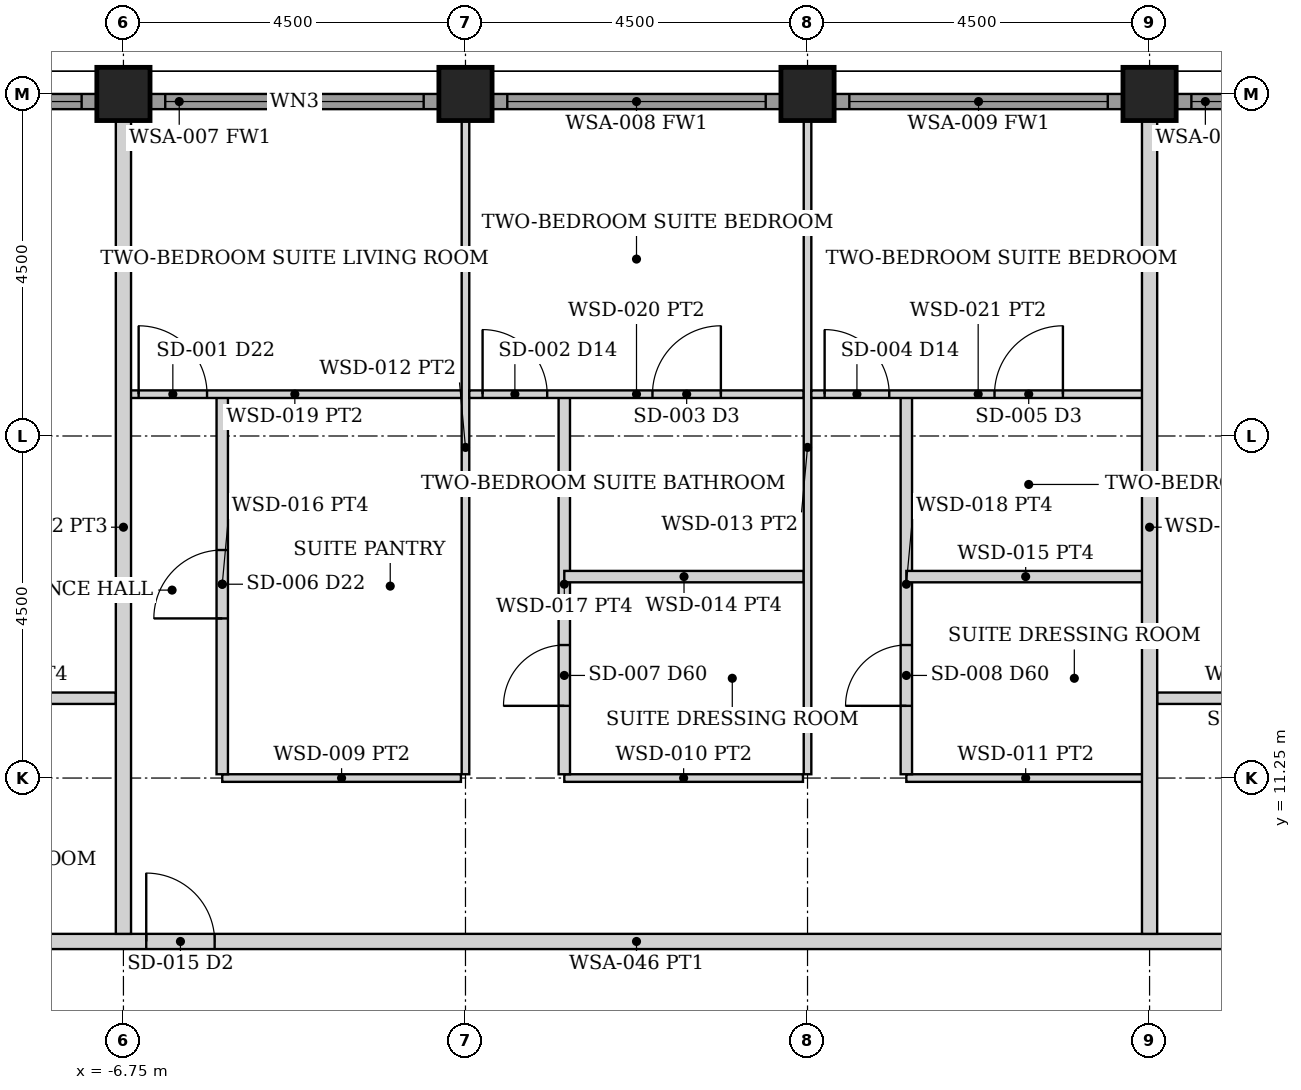
"""IFC4 building model, lengths in metres.
Left out: names, types, materials, properties, quantities, classifications, styles, units other than length and angle.
Written with IfcOpenShell. Run it as: python <this file> out.ifc"""

import sys

from ifc_helpers import new_model, si_unit, direction, frame, frame_2d, origin, origin_2d, place, context, subcontext, project, spatial, rectangle, hollow_rectangle, extrude, element, fill, save


model = new_model("IFC4")
c1 = context("Model", 3, precision=1e-05, world=origin(), true_north=direction((0.0, 1.0)))
c2 = subcontext(c1, "Body", "Model", "MODEL_VIEW")
j1 = project(units=[si_unit("LENGTHUNIT", "METRE"), si_unit("PLANEANGLEUNIT", "RADIAN")], contexts=[c1])
p1 = place(None, origin())
s1 = spatial("IfcSite", under=j1, at=p1, CompositionType="ELEMENT")
p2 = place(p1, origin())
s2 = spatial("IfcBuilding", under=s1, at=p2, CompositionType="ELEMENT")
p3 = place(p2, frame((0.0, 0.0, 234.55)))
s3 = spatial("IfcBuildingStorey", under=s2, at=p3, CompositionType="ELEMENT", Elevation=234.55)
for number, where, z_axis, x_axis in (
    (1, (-6.75, 20.25, 0.0), (0.0, 0.0, 1.0), (0.0, 1.0, 0.0)),
    (2, (-2.25, 20.25, 0.0), (0.0, 0.0, 1.0), (0.0, 1.0, 0.0)),
    (3, (2.25, 20.25, 0.0), (0.0, 0.0, 1.0), (0.0, 1.0, 0.0)),
    (4, (6.75, 20.25, 0.0), (0.0, 0.0, 1.0), (0.0, 1.0, 0.0)),
):
    element("IfcColumn", number, at=place(p3, frame(where, z_axis=z_axis, x_axis=x_axis)), inside=s3, PredefinedType="COLUMN", context=c2, shape_type="SweptSolid", body=[
        extrude(hollow_rectangle(XDim=0.7, YDim=0.7, WallThickness=0.04, at=origin_2d()), origin(), (0.0, 0.0, 1.0), 3.75),
    ])
p4 = place(p3, frame((-10.895, 20.15, 0.0), z_axis=(0.0, 0.0, 1.0), x_axis=(1.0, 0.0, 0.0)))
e5 = element("IfcWall", 5, at=p4, inside=s3, PredefinedType="SOLIDWALL", context=c2, shape_type="SweptSolid", body=[
    extrude(rectangle(XDim=3.79, YDim=0.2, at=frame_2d((1.895, 0.0))), origin(), (0.0, 0.0, 1.0), 2.629),
])
p5 = place(p4, frame((0.195, 0.0, 0.3)))
e6 = element("IfcOpeningElement", 6, at=p5, cuts=e5, PredefinedType="OPENING", context=c2, shape_type="SweptSolid", body=[
    extrude(rectangle(XDim=3.4, YDim=2.179, at=frame_2d((1.7, 1.089))), frame((0.0, 0.11, 0.0), z_axis=(0.0, -1.0, 0.0), x_axis=(1.0, 0.0, 0.0)), (0.0, 0.0, 1.0), 0.22),
])
p6 = place(p3, frame((-6.395, 20.15, 0.0), z_axis=(0.0, 0.0, 1.0), x_axis=(1.0, 0.0, 0.0)))
e7 = element("IfcWall", 7, at=p6, inside=s3, PredefinedType="SOLIDWALL", context=c2, shape_type="SweptSolid", body=[
    extrude(rectangle(XDim=3.79, YDim=0.2, at=frame_2d((1.895, 0.0))), origin(), (0.0, 0.0, 1.0), 2.629),
])
p7 = place(p6, frame((0.195, 0.0, 0.3)))
e8 = element("IfcOpeningElement", 8, at=p7, cuts=e7, PredefinedType="OPENING", context=c2, shape_type="SweptSolid", body=[
    extrude(rectangle(XDim=3.4, YDim=2.179, at=frame_2d((1.7, 1.089))), frame((0.0, 0.11, 0.0), z_axis=(0.0, -1.0, 0.0), x_axis=(1.0, 0.0, 0.0)), (0.0, 0.0, 1.0), 0.22),
])
p8 = place(p3, frame((-1.895, 20.15, 0.0), z_axis=(0.0, 0.0, 1.0), x_axis=(1.0, 0.0, 0.0)))
e9 = element("IfcWall", 9, at=p8, inside=s3, PredefinedType="SOLIDWALL", context=c2, shape_type="SweptSolid", body=[
    extrude(rectangle(XDim=3.79, YDim=0.2, at=frame_2d((1.895, 0.0))), origin(), (0.0, 0.0, 1.0), 2.629),
])
p9 = place(p8, frame((0.195, 0.0, 0.3)))
e10 = element("IfcOpeningElement", 10, at=p9, cuts=e9, PredefinedType="OPENING", context=c2, shape_type="SweptSolid", body=[
    extrude(rectangle(XDim=3.4, YDim=2.179, at=frame_2d((1.7, 1.089))), frame((0.0, 0.11, 0.0), z_axis=(0.0, -1.0, 0.0), x_axis=(1.0, 0.0, 0.0)), (0.0, 0.0, 1.0), 0.22),
])
p10 = place(p3, frame((2.605, 20.15, 0.0), z_axis=(0.0, 0.0, 1.0), x_axis=(1.0, 0.0, 0.0)))
e11 = element("IfcWall", 11, at=p10, inside=s3, PredefinedType="SOLIDWALL", context=c2, shape_type="SweptSolid", body=[
    extrude(rectangle(XDim=3.79, YDim=0.2, at=frame_2d((1.895, 0.0))), origin(), (0.0, 0.0, 1.0), 2.629),
])
p11 = place(p10, frame((0.195, 0.0, 0.3)))
e12 = element("IfcOpeningElement", 12, at=p11, cuts=e11, PredefinedType="OPENING", context=c2, shape_type="SweptSolid", body=[
    extrude(rectangle(XDim=3.4, YDim=2.179, at=frame_2d((1.7, 1.089))), frame((0.0, 0.11, 0.0), z_axis=(0.0, -1.0, 0.0), x_axis=(1.0, 0.0, 0.0)), (0.0, 0.0, 1.0), 0.22),
])
p12 = place(p3, frame((7.105, 20.15, 0.0), z_axis=(0.0, 0.0, 1.0), x_axis=(1.0, 0.0, 0.0)))
e13 = element("IfcWall", 13, at=p12, inside=s3, PredefinedType="SOLIDWALL", context=c2, shape_type="SweptSolid", body=[
    extrude(rectangle(XDim=3.79, YDim=0.2, at=frame_2d((1.895, 0.0))), origin(), (0.0, 0.0, 1.0), 2.629),
])
p13 = place(p12, frame((0.195, 0.0, 0.3)))
e14 = element("IfcOpeningElement", 14, at=p13, cuts=e13, PredefinedType="OPENING", context=c2, shape_type="SweptSolid", body=[
    extrude(rectangle(XDim=3.4, YDim=2.179, at=frame_2d((1.7, 1.089))), frame((0.0, 0.11, 0.0), z_axis=(0.0, -1.0, 0.0), x_axis=(1.0, 0.0, 0.0)), (0.0, 0.0, 1.0), 0.22),
])
p14 = place(p3, frame((-20.05, 9.1, 0.0), z_axis=(0.0, 0.0, 1.0), x_axis=(1.0, 0.0, 0.0)))
e15 = element("IfcWall", 15, at=p14, inside=s3, PredefinedType="PARTITIONING", context=c2, shape_type="SweptSolid", body=[
    extrude(rectangle(XDim=40.1, YDim=0.2, at=frame_2d((20.05, 0.0))), origin(), (0.0, 0.0, 1.0), 2.629),
])
p15 = place(p14, frame((9.0, 0.0, 0.0)))
e16 = element("IfcOpeningElement", 16, at=p15, cuts=e15, PredefinedType="OPENING", context=c2, shape_type="SweptSolid", body=[
    extrude(rectangle(XDim=0.9, YDim=2.1, at=frame_2d((0.45, 1.05))), frame((0.0, 0.11, 0.0), z_axis=(0.0, -1.0, 0.0), x_axis=(1.0, 0.0, 0.0)), (0.0, 0.0, 1.0), 0.22),
])
p16 = place(p14, frame((13.6, 0.0, 0.0)))
e17 = element("IfcOpeningElement", 17, at=p16, cuts=e15, PredefinedType="OPENING", context=c2, shape_type="SweptSolid", body=[
    extrude(rectangle(XDim=0.9, YDim=2.1, at=frame_2d((0.45, 1.05))), frame((0.0, 0.11, 0.0), z_axis=(0.0, -1.0, 0.0), x_axis=(1.0, 0.0, 0.0)), (0.0, 0.0, 1.0), 0.22),
])
p17 = place(p14, frame((30.2, 0.0, 0.0)))
e18 = element("IfcOpeningElement", 18, at=p17, cuts=e15, PredefinedType="OPENING", context=c2, shape_type="SweptSolid", body=[
    extrude(rectangle(XDim=0.9, YDim=2.1, at=frame_2d((0.45, 1.05))), frame((0.0, 0.11, 0.0), z_axis=(0.0, -1.0, 0.0), x_axis=(1.0, 0.0, 0.0)), (0.0, 0.0, 1.0), 0.22),
])
p18 = place(p14, frame((31.75, 0.0, 0.0)))
e19 = element("IfcOpeningElement", 19, at=p18, cuts=e15, PredefinedType="OPENING", context=c2, shape_type="SweptSolid", body=[
    extrude(rectangle(XDim=0.9, YDim=2.1, at=frame_2d((0.45, 1.05))), frame((0.0, 0.11, 0.0), z_axis=(0.0, -1.0, 0.0), x_axis=(1.0, 0.0, 0.0)), (0.0, 0.0, 1.0), 0.22),
])
p19 = place(p14, frame((7.45, 0.0, 0.0)))
e20 = element("IfcOpeningElement", 20, at=p19, cuts=e15, PredefinedType="OPENING", context=c2, shape_type="SweptSolid", body=[
    extrude(rectangle(XDim=0.9, YDim=2.1, at=frame_2d((0.45, 1.05))), frame((0.0, 0.11, 0.0), z_axis=(0.0, -1.0, 0.0), x_axis=(1.0, 0.0, 0.0)), (0.0, 0.0, 1.0), 0.22),
])
p20 = place(p3, frame((-9.9, 12.3, 0.0), z_axis=(0.0, 0.0, 1.0), x_axis=(1.0, 0.0, 0.0)))
e21 = element("IfcWall", 21, at=p20, inside=s3, PredefinedType="PARTITIONING", context=c2, shape_type="SweptSolid", body=[
    extrude(rectangle(XDim=3.05, YDim=0.15, at=frame_2d((1.525, 0.0))), origin(), (0.0, 0.0, 1.0), 2.629),
])
p21 = place(p3, frame((-5.45, 11.25, 0.0), z_axis=(0.0, 0.0, 1.0), x_axis=(1.0, 0.0, 0.0)))
e22 = element("IfcWall", 22, at=p21, inside=s3, PredefinedType="PARTITIONING", context=c2, shape_type="SweptSolid", body=[
    extrude(rectangle(XDim=3.14, YDim=0.1, at=frame_2d((1.57, 0.0))), origin(), (0.0, 0.0, 1.0), 2.629),
])
p22 = place(p3, frame((-5.45, 11.3, 0.0), z_axis=(0.0, 0.0, 1.0), x_axis=(0.0, 1.0, 0.0)))
e23 = element("IfcWall", 23, at=p22, inside=s3, PredefinedType="PARTITIONING", context=c2, shape_type="SweptSolid", body=[
    extrude(rectangle(XDim=5.0, YDim=0.15, at=frame_2d((2.5, 0.0))), origin(), (0.0, 0.0, 1.0), 2.629),
])
p23 = place(p22, frame((2.05, 0.0, 0.0)))
e24 = element("IfcOpeningElement", 24, at=p23, cuts=e23, PredefinedType="OPENING", context=c2, shape_type="SweptSolid", body=[
    extrude(rectangle(XDim=0.9, YDim=2.1, at=frame_2d((0.45, 1.05))), frame((0.0, 0.085, 0.0), z_axis=(0.0, -1.0, 0.0), x_axis=(1.0, 0.0, 0.0)), (0.0, 0.0, 1.0), 0.17),
])
p24 = place(p3, frame((-6.69, 16.3, 0.0), z_axis=(0.0, 0.0, 1.0), x_axis=(1.0, 0.0, 0.0)))
e25 = element("IfcWall", 25, at=p24, inside=s3, PredefinedType="PARTITIONING", context=c2, shape_type="SweptSolid", body=[
    extrude(rectangle(XDim=4.39, YDim=0.1, at=frame_2d((2.195, 0.0))), origin(), (0.0, 0.0, 1.0), 2.629),
])
p25 = place(p24, frame((0.14, 0.0, 0.0)))
e26 = element("IfcOpeningElement", 26, at=p25, cuts=e25, PredefinedType="OPENING", context=c2, shape_type="SweptSolid", body=[
    extrude(rectangle(XDim=0.9, YDim=2.1, at=frame_2d((0.45, 1.05))), frame((0.0, 0.06, 0.0), z_axis=(0.0, -1.0, 0.0), x_axis=(1.0, 0.0, 0.0)), (0.0, 0.0, 1.0), 0.12),
])
p26 = place(p3, frame((-2.25, 11.3, 0.0), z_axis=(0.0, 0.0, 1.0), x_axis=(0.0, 1.0, 0.0)))
e27 = element("IfcWall", 27, at=p26, inside=s3, PredefinedType="PARTITIONING", context=c2, shape_type="SweptSolid", body=[
    extrude(rectangle(XDim=8.6, YDim=0.1, at=frame_2d((4.3, 0.0))), origin(), (0.0, 0.0, 1.0), 2.629),
])
p27 = place(p3, frame((-0.95, 11.25, 0.0), z_axis=(0.0, 0.0, 1.0), x_axis=(1.0, 0.0, 0.0)))
e28 = element("IfcWall", 28, at=p27, inside=s3, PredefinedType="PARTITIONING", context=c2, shape_type="SweptSolid", body=[
    extrude(rectangle(XDim=3.14, YDim=0.1, at=frame_2d((1.57, 0.0))), origin(), (0.0, 0.0, 1.0), 2.629),
])
p28 = place(p3, frame((-0.95, 11.3, 0.0), z_axis=(0.0, 0.0, 1.0), x_axis=(0.0, 1.0, 0.0)))
e29 = element("IfcWall", 29, at=p28, inside=s3, PredefinedType="PARTITIONING", context=c2, shape_type="SweptSolid", body=[
    extrude(rectangle(XDim=5.0, YDim=0.15, at=frame_2d((2.5, 0.0))), origin(), (0.0, 0.0, 1.0), 2.629),
])
p29 = place(p28, frame((0.9, 0.0, 0.0)))
e30 = element("IfcOpeningElement", 30, at=p29, cuts=e29, PredefinedType="OPENING", context=c2, shape_type="SweptSolid", body=[
    extrude(rectangle(XDim=0.8, YDim=2.1, at=frame_2d((0.4, 1.05))), frame((0.0, 0.085, 0.0), z_axis=(0.0, -1.0, 0.0), x_axis=(1.0, 0.0, 0.0)), (0.0, 0.0, 1.0), 0.17),
])
p30 = place(p3, frame((-2.2, 16.3, 0.0), z_axis=(0.0, 0.0, 1.0), x_axis=(1.0, 0.0, 0.0)))
e31 = element("IfcWall", 31, at=p30, inside=s3, PredefinedType="PARTITIONING", context=c2, shape_type="SweptSolid", body=[
    extrude(rectangle(XDim=4.4, YDim=0.1, at=frame_2d((2.2, 0.0))), origin(), (0.0, 0.0, 1.0), 2.629),
])
p31 = place(p30, frame((0.175, 0.0, 0.0)))
e32 = element("IfcOpeningElement", 32, at=p31, cuts=e31, PredefinedType="OPENING", context=c2, shape_type="SweptSolid", body=[
    extrude(rectangle(XDim=0.85, YDim=2.1, at=frame_2d((0.425, 1.05))), frame((0.0, 0.06, 0.0), z_axis=(0.0, -1.0, 0.0), x_axis=(1.0, 0.0, 0.0)), (0.0, 0.0, 1.0), 0.12),
])
p32 = place(p30, frame((2.41, 0.0, 0.0)))
e33 = element("IfcOpeningElement", 33, at=p32, cuts=e31, PredefinedType="OPENING", context=c2, shape_type="SweptSolid", body=[
    extrude(rectangle(XDim=0.9, YDim=2.1, at=frame_2d((0.45, 1.05))), frame((0.0, 0.06, 0.0), z_axis=(0.0, -1.0, 0.0), x_axis=(1.0, 0.0, 0.0)), (0.0, 0.0, 1.0), 0.12),
])
p33 = place(p3, frame((-0.95, 13.9, 0.0), z_axis=(0.0, 0.0, 1.0), x_axis=(1.0, 0.0, 0.0)))
e34 = element("IfcWall", 34, at=p33, inside=s3, PredefinedType="PARTITIONING", context=c2, shape_type="SweptSolid", body=[
    extrude(rectangle(XDim=3.15, YDim=0.15, at=frame_2d((1.575, 0.0))), origin(), (0.0, 0.0, 1.0), 2.629),
])
p34 = place(p3, frame((2.25, 11.3, 0.0), z_axis=(0.0, 0.0, 1.0), x_axis=(0.0, 1.0, 0.0)))
e35 = element("IfcWall", 35, at=p34, inside=s3, PredefinedType="PARTITIONING", context=c2, shape_type="SweptSolid", body=[
    extrude(rectangle(XDim=8.6, YDim=0.1, at=frame_2d((4.3, 0.0))), origin(), (0.0, 0.0, 1.0), 2.629),
])
p35 = place(p3, frame((3.55, 11.25, 0.0), z_axis=(0.0, 0.0, 1.0), x_axis=(1.0, 0.0, 0.0)))
e36 = element("IfcWall", 36, at=p35, inside=s3, PredefinedType="PARTITIONING", context=c2, shape_type="SweptSolid", body=[
    extrude(rectangle(XDim=3.14, YDim=0.1, at=frame_2d((1.57, 0.0))), origin(), (0.0, 0.0, 1.0), 2.629),
])
p36 = place(p3, frame((3.55, 11.3, 0.0), z_axis=(0.0, 0.0, 1.0), x_axis=(0.0, 1.0, 0.0)))
e37 = element("IfcWall", 37, at=p36, inside=s3, PredefinedType="PARTITIONING", context=c2, shape_type="SweptSolid", body=[
    extrude(rectangle(XDim=5.0, YDim=0.15, at=frame_2d((2.5, 0.0))), origin(), (0.0, 0.0, 1.0), 2.629),
])
p37 = place(p36, frame((0.9, 0.0, 0.0)))
e38 = element("IfcOpeningElement", 38, at=p37, cuts=e37, PredefinedType="OPENING", context=c2, shape_type="SweptSolid", body=[
    extrude(rectangle(XDim=0.8, YDim=2.1, at=frame_2d((0.4, 1.05))), frame((0.0, 0.085, 0.0), z_axis=(0.0, -1.0, 0.0), x_axis=(1.0, 0.0, 0.0)), (0.0, 0.0, 1.0), 0.17),
])
p38 = place(p3, frame((2.3, 16.3, 0.0), z_axis=(0.0, 0.0, 1.0), x_axis=(1.0, 0.0, 0.0)))
e39 = element("IfcWall", 39, at=p38, inside=s3, PredefinedType="PARTITIONING", context=c2, shape_type="SweptSolid", body=[
    extrude(rectangle(XDim=4.39, YDim=0.1, at=frame_2d((2.195, 0.0))), origin(), (0.0, 0.0, 1.0), 2.629),
])
p39 = place(p38, frame((0.175, 0.0, 0.0)))
e40 = element("IfcOpeningElement", 40, at=p39, cuts=e39, PredefinedType="OPENING", context=c2, shape_type="SweptSolid", body=[
    extrude(rectangle(XDim=0.85, YDim=2.1, at=frame_2d((0.425, 1.05))), frame((0.0, 0.06, 0.0), z_axis=(0.0, -1.0, 0.0), x_axis=(1.0, 0.0, 0.0)), (0.0, 0.0, 1.0), 0.12),
])
p40 = place(p38, frame((2.41, 0.0, 0.0)))
e41 = element("IfcOpeningElement", 41, at=p40, cuts=e39, PredefinedType="OPENING", context=c2, shape_type="SweptSolid", body=[
    extrude(rectangle(XDim=0.9, YDim=2.1, at=frame_2d((0.45, 1.05))), frame((0.0, 0.06, 0.0), z_axis=(0.0, -1.0, 0.0), x_axis=(1.0, 0.0, 0.0)), (0.0, 0.0, 1.0), 0.12),
])
p41 = place(p3, frame((3.55, 13.9, 0.0), z_axis=(0.0, 0.0, 1.0), x_axis=(1.0, 0.0, 0.0)))
e42 = element("IfcWall", 42, at=p41, inside=s3, PredefinedType="PARTITIONING", context=c2, shape_type="SweptSolid", body=[
    extrude(rectangle(XDim=3.14, YDim=0.15, at=frame_2d((1.57, 0.0))), origin(), (0.0, 0.0, 1.0), 2.629),
])
p42 = place(p3, frame((6.85, 12.3, 0.0), z_axis=(0.0, 0.0, 1.0), x_axis=(1.0, 0.0, 0.0)))
e43 = element("IfcWall", 43, at=p42, inside=s3, PredefinedType="PARTITIONING", context=c2, shape_type="SweptSolid", body=[
    extrude(rectangle(XDim=3.05, YDim=0.15, at=frame_2d((1.525, 0.0))), origin(), (0.0, 0.0, 1.0), 2.629),
])
for number, where, z_axis, x_axis in (
    (44, (-6.75, 9.2, 0.0), (0.0, 0.0, 1.0), (0.0, 1.0, 0.0)),
    (45, (6.75, 9.2, 0.0), (0.0, 0.0, 1.0), (0.0, 1.0, 0.0)),
):
    element("IfcWall", number, at=place(p3, frame(where, z_axis=z_axis, x_axis=x_axis)), inside=s3, PredefinedType="PARTITIONING", context=c2, shape_type="SweptSolid", body=[
        extrude(rectangle(XDim=10.7, YDim=0.2, at=frame_2d((5.35, 0.0))), origin(), (0.0, 0.0, 1.0), 2.629),
    ])
p43 = place(p5, origin())
e46 = element("IfcWindow", 46, at=p43, inside=s3, PartitioningType="SINGLE_PANEL", PredefinedType="WINDOW", context=c2, shape_type="SweptSolid", body=[
    extrude(rectangle(XDim=3.4, YDim=2.179, at=frame_2d((1.7, 1.089))), frame((0.0, 0.03, 0.0), z_axis=(0.0, -1.0, 0.0), x_axis=(1.0, 0.0, 0.0)), (0.0, 0.0, 1.0), 0.06),
])
fill(e6, e46)
p44 = place(p7, origin())
e47 = element("IfcWindow", 47, at=p44, inside=s3, PartitioningType="SINGLE_PANEL", PredefinedType="WINDOW", context=c2, shape_type="SweptSolid", body=[
    extrude(rectangle(XDim=3.4, YDim=2.179, at=frame_2d((1.7, 1.089))), frame((0.0, 0.03, 0.0), z_axis=(0.0, -1.0, 0.0), x_axis=(1.0, 0.0, 0.0)), (0.0, 0.0, 1.0), 0.06),
])
fill(e8, e47)
p45 = place(p9, origin())
e48 = element("IfcWindow", 48, at=p45, inside=s3, PartitioningType="SINGLE_PANEL", PredefinedType="WINDOW", context=c2, shape_type="SweptSolid", body=[
    extrude(rectangle(XDim=3.4, YDim=2.179, at=frame_2d((1.7, 1.089))), frame((0.0, 0.03, 0.0), z_axis=(0.0, -1.0, 0.0), x_axis=(1.0, 0.0, 0.0)), (0.0, 0.0, 1.0), 0.06),
])
fill(e10, e48)
p46 = place(p11, origin())
e49 = element("IfcWindow", 49, at=p46, inside=s3, PartitioningType="SINGLE_PANEL", PredefinedType="WINDOW", context=c2, shape_type="SweptSolid", body=[
    extrude(rectangle(XDim=3.4, YDim=2.179, at=frame_2d((1.7, 1.089))), frame((0.0, 0.03, 0.0), z_axis=(0.0, -1.0, 0.0), x_axis=(1.0, 0.0, 0.0)), (0.0, 0.0, 1.0), 0.06),
])
fill(e12, e49)
p47 = place(p13, origin())
e50 = element("IfcWindow", 50, at=p47, inside=s3, PartitioningType="SINGLE_PANEL", PredefinedType="WINDOW", context=c2, shape_type="SweptSolid", body=[
    extrude(rectangle(XDim=3.4, YDim=2.179, at=frame_2d((1.7, 1.089))), frame((0.0, 0.03, 0.0), z_axis=(0.0, -1.0, 0.0), x_axis=(1.0, 0.0, 0.0)), (0.0, 0.0, 1.0), 0.06),
])
fill(e14, e50)
p48 = place(p16, origin())
e51 = element("IfcDoor", 51, at=p48, inside=s3, OperationType="SINGLE_SWING_LEFT", PredefinedType="DOOR", context=c2, shape_type="SweptSolid", body=[
    extrude(rectangle(XDim=0.9, YDim=2.1, at=frame_2d((0.45, 1.05))), frame((0.0, 0.025, 0.0), z_axis=(0.0, -1.0, 0.0), x_axis=(1.0, 0.0, 0.0)), (0.0, 0.0, 1.0), 0.05),
])
fill(e17, e51)
p49 = place(p23, origin())
e52 = element("IfcDoor", 52, at=p49, inside=s3, OperationType="SINGLE_SWING_LEFT", PredefinedType="DOOR", context=c2, shape_type="SweptSolid", body=[
    extrude(rectangle(XDim=0.9, YDim=2.1, at=frame_2d((0.45, 1.05))), frame((0.0, 0.025, 0.0), z_axis=(0.0, -1.0, 0.0), x_axis=(1.0, 0.0, 0.0)), (0.0, 0.0, 1.0), 0.05),
])
fill(e24, e52)
p50 = place(p25, origin())
e53 = element("IfcDoor", 53, at=p50, inside=s3, OperationType="SINGLE_SWING_LEFT", PredefinedType="DOOR", context=c2, shape_type="SweptSolid", body=[
    extrude(rectangle(XDim=0.9, YDim=2.1, at=frame_2d((0.45, 1.05))), frame((0.0, 0.025, 0.0), z_axis=(0.0, -1.0, 0.0), x_axis=(1.0, 0.0, 0.0)), (0.0, 0.0, 1.0), 0.05),
])
fill(e26, e53)
p51 = place(p31, origin())
e54 = element("IfcDoor", 54, at=p51, inside=s3, OperationType="SINGLE_SWING_LEFT", PredefinedType="DOOR", context=c2, shape_type="SweptSolid", body=[
    extrude(rectangle(XDim=0.85, YDim=2.1, at=frame_2d((0.425, 1.05))), frame((0.0, 0.025, 0.0), z_axis=(0.0, -1.0, 0.0), x_axis=(1.0, 0.0, 0.0)), (0.0, 0.0, 1.0), 0.05),
])
fill(e32, e54)
p52 = place(p29, origin())
e55 = element("IfcDoor", 55, at=p52, inside=s3, OperationType="SINGLE_SWING_LEFT", PredefinedType="DOOR", context=c2, shape_type="SweptSolid", body=[
    extrude(rectangle(XDim=0.8, YDim=2.1, at=frame_2d((0.4, 1.05))), frame((0.0, 0.025, 0.0), z_axis=(0.0, -1.0, 0.0), x_axis=(1.0, 0.0, 0.0)), (0.0, 0.0, 1.0), 0.05),
])
fill(e30, e55)
p53 = place(p32, origin())
e56 = element("IfcDoor", 56, at=p53, inside=s3, OperationType="SINGLE_SWING_RIGHT", PredefinedType="DOOR", context=c2, shape_type="SweptSolid", body=[
    extrude(rectangle(XDim=0.9, YDim=2.1, at=frame_2d((0.45, 1.05))), frame((0.0, 0.025, 0.0), z_axis=(0.0, -1.0, 0.0), x_axis=(1.0, 0.0, 0.0)), (0.0, 0.0, 1.0), 0.05),
])
fill(e33, e56)
p54 = place(p39, origin())
e57 = element("IfcDoor", 57, at=p54, inside=s3, OperationType="SINGLE_SWING_LEFT", PredefinedType="DOOR", context=c2, shape_type="SweptSolid", body=[
    extrude(rectangle(XDim=0.85, YDim=2.1, at=frame_2d((0.425, 1.05))), frame((0.0, 0.025, 0.0), z_axis=(0.0, -1.0, 0.0), x_axis=(1.0, 0.0, 0.0)), (0.0, 0.0, 1.0), 0.05),
])
fill(e40, e57)
p55 = place(p37, origin())
e58 = element("IfcDoor", 58, at=p55, inside=s3, OperationType="SINGLE_SWING_LEFT", PredefinedType="DOOR", context=c2, shape_type="SweptSolid", body=[
    extrude(rectangle(XDim=0.8, YDim=2.1, at=frame_2d((0.4, 1.05))), frame((0.0, 0.025, 0.0), z_axis=(0.0, -1.0, 0.0), x_axis=(1.0, 0.0, 0.0)), (0.0, 0.0, 1.0), 0.05),
])
fill(e38, e58)
p56 = place(p40, origin())
e59 = element("IfcDoor", 59, at=p56, inside=s3, OperationType="SINGLE_SWING_RIGHT", PredefinedType="DOOR", context=c2, shape_type="SweptSolid", body=[
    extrude(rectangle(XDim=0.9, YDim=2.1, at=frame_2d((0.45, 1.05))), frame((0.0, 0.025, 0.0), z_axis=(0.0, -1.0, 0.0), x_axis=(1.0, 0.0, 0.0)), (0.0, 0.0, 1.0), 0.05),
])
fill(e41, e59)
save(model, sys.argv[1])
